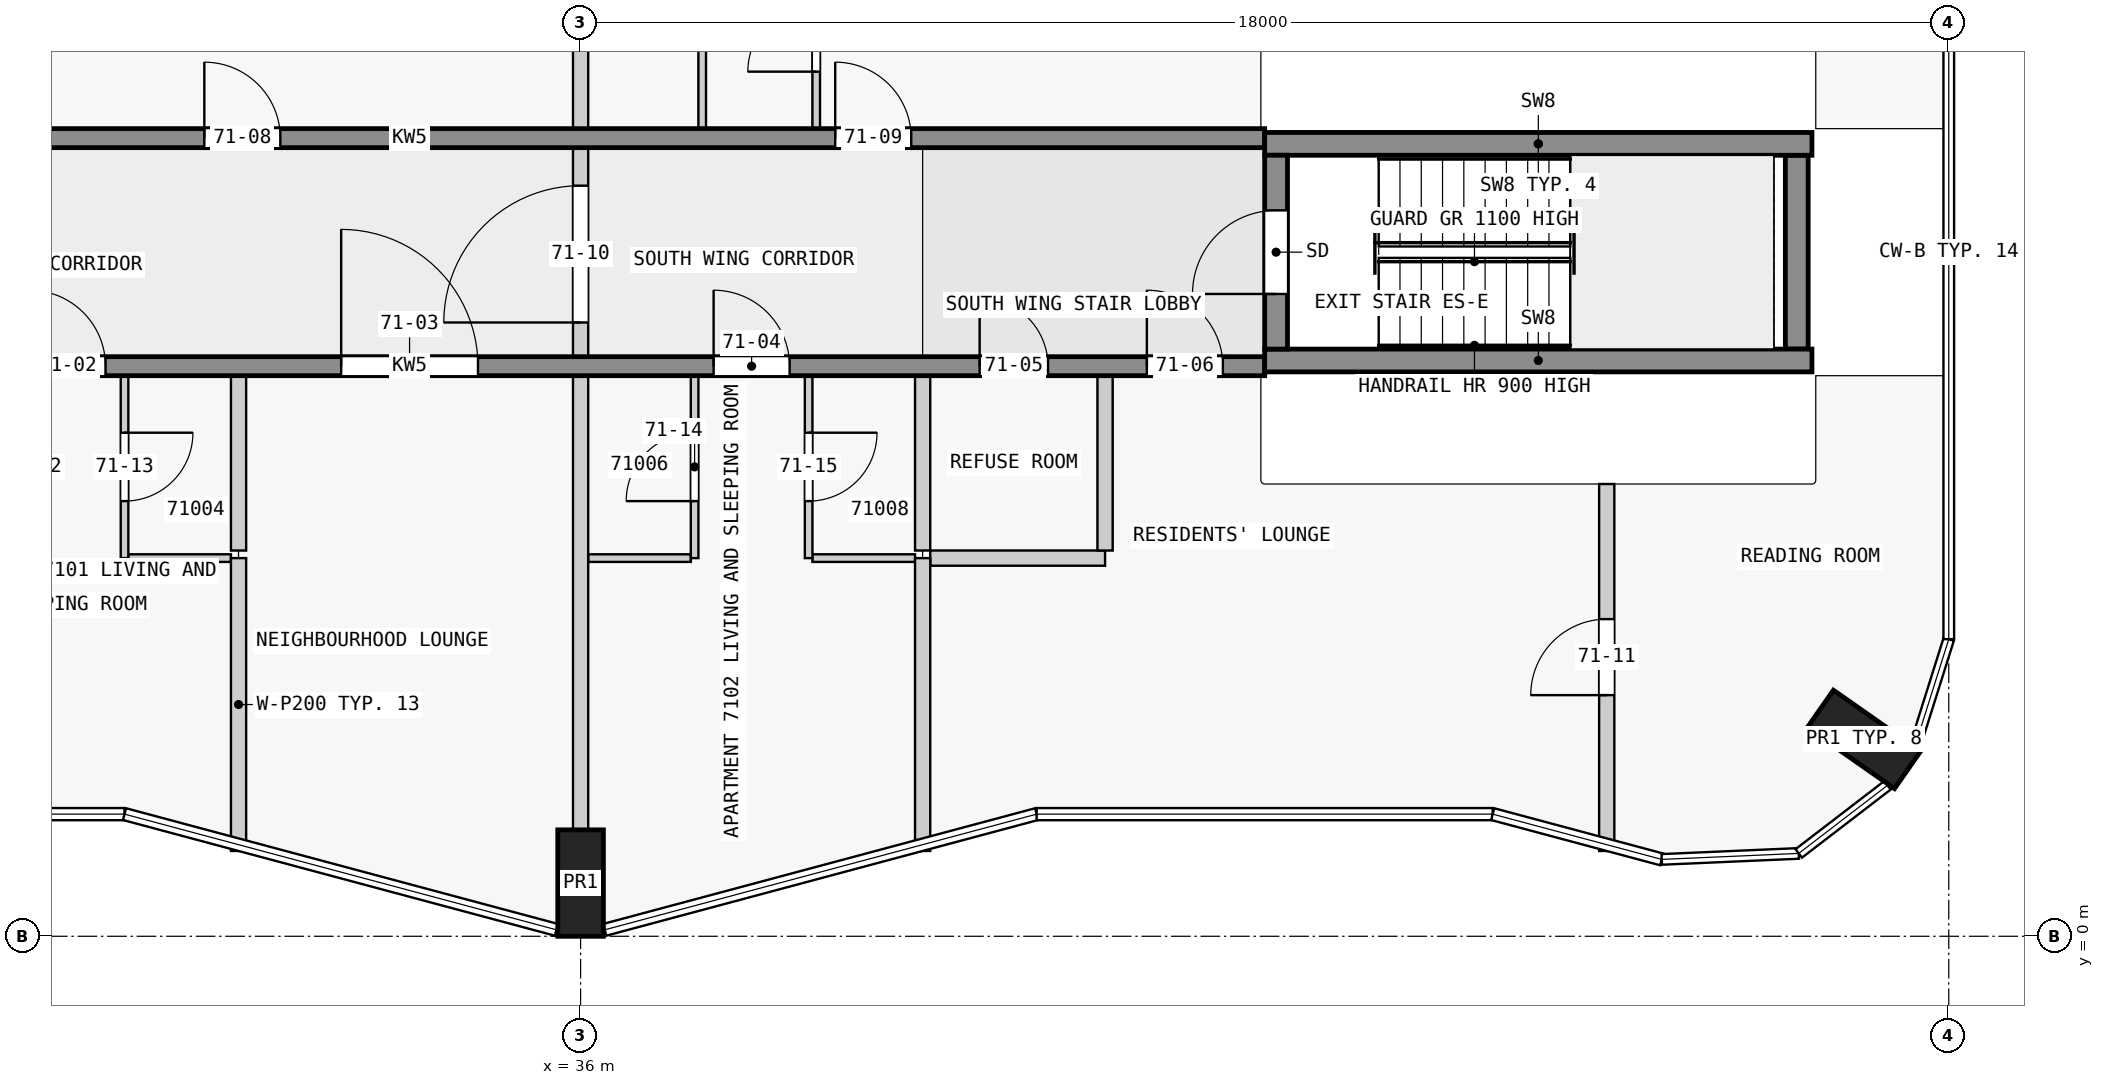
"""IFC4 building model, lengths in metres.
Left out: names, types, materials, properties, quantities, classifications, styles, units other than length and angle.
Written with IfcOpenShell. Run it as: python <this file> out.ifc"""

import sys

from ifc_helpers import new_model, si_unit, direction, frame, frame_2d, origin, origin_2d, place, context, subcontext, project, spatial, rectangle, extrude, element, fill, save


model = new_model("IFC4")
c1 = context("Model", 3, precision=1e-05, world=origin(), true_north=direction((0.0, 1.0)))
c2 = subcontext(c1, "Body", "Model", "MODEL_VIEW")
j1 = project(units=[si_unit("LENGTHUNIT", "METRE"), si_unit("PLANEANGLEUNIT", "RADIAN")], contexts=[c1])
p1 = place(None, origin())
s1 = spatial("IfcSite", under=j1, at=p1, CompositionType="ELEMENT")
p2 = place(p1, origin())
s2 = spatial("IfcBuilding", under=s1, at=p2, CompositionType="ELEMENT")
p3 = place(p2, frame((0.0, 0.0, 270.4)))
s3 = spatial("IfcBuildingStorey", under=s2, at=p3, CompositionType="ELEMENT", Elevation=270.4)
for number, where, z_axis, x_axis in (
    (1, (36.0, 0.7, 0.0), (0.0, 0.0, 1.0), (1.0, 0.0, 0.0)),
    (2, (52.884, 2.59, 0.0), (0.0, 0.0, 1.0), (0.574, 0.819, 0.0)),
):
    element("IfcColumn", number, at=place(p3, frame(where, z_axis=z_axis, x_axis=x_axis)), inside=s3, PredefinedType="COLUMN", context=c2, shape_type="SweptSolid", body=[
        extrude(rectangle(XDim=0.6, YDim=1.4, at=origin_2d()), origin(), (0.0, 0.0, 1.0), 3.5),
    ])
p4 = place(p3, frame((45.15, 7.725, 0.0), z_axis=(0.0, 0.0, 1.0), x_axis=(0.0, 1.0, 0.0)))
e3 = element("IfcWall", 3, at=p4, inside=s3, PredefinedType="SHEAR", context=c2, shape_type="SweptSolid", body=[
    extrude(rectangle(XDim=2.55, YDim=0.3, at=frame_2d((1.275, 0.0))), origin(), (0.0, 0.0, 1.0), 3.5),
])
p5 = place(p4, frame((0.725, 0.0, 0.0)))
e4 = element("IfcOpeningElement", 4, at=p5, cuts=e3, PredefinedType="OPENING", context=c2, shape_type="SweptSolid", body=[
    extrude(rectangle(XDim=1.1, YDim=2.1, at=frame_2d((0.55, 1.05))), frame((0.0, 0.16, 0.0), z_axis=(0.0, -1.0, 0.0), x_axis=(1.0, 0.0, 0.0)), (0.0, 0.0, 1.0), 0.32),
])
p6 = place(p3, frame((52.0, 7.725, 0.0), z_axis=(0.0, 0.0, 1.0), x_axis=(0.0, 1.0, 0.0)))
e5 = element("IfcWall", 5, at=p6, inside=s3, PredefinedType="SHEAR", context=c2, shape_type="SweptSolid", body=[
    extrude(rectangle(XDim=2.55, YDim=0.3, at=frame_2d((1.275, 0.0))), origin(), (0.0, 0.0, 1.0), 3.5),
])
for number, where, z_axis, x_axis in (
    (6, (45.0, 7.575, 0.0), (0.0, 0.0, 1.0), (1.0, 0.0, 0.0)),
    (7, (45.0, 10.425, 0.0), (0.0, 0.0, 1.0), (1.0, 0.0, 0.0)),
):
    element("IfcWall", number, at=place(p3, frame(where, z_axis=z_axis, x_axis=x_axis)), inside=s3, PredefinedType="SHEAR", context=c2, shape_type="SweptSolid", body=[
        extrude(rectangle(XDim=7.2, YDim=0.3, at=frame_2d((3.6, 0.0))), origin(), (0.0, 0.0, 1.0), 3.5),
    ])
p7 = place(p3, frame((22.5, 7.5, 0.0), z_axis=(0.0, 0.0, 1.0), x_axis=(1.0, 0.0, 0.0)))
e8 = element("IfcWall", 8, at=p7, inside=s3, PredefinedType="SHEAR", context=c2, shape_type="SweptSolid", body=[
    extrude(rectangle(XDim=22.5, YDim=0.25, at=frame_2d((11.25, 0.0))), origin(), (0.0, 0.0, 1.0), 3.25),
])
p8 = place(p7, frame((1.75, 0.0, 0.0)))
e9 = element("IfcOpeningElement", 9, at=p8, cuts=e8, PredefinedType="OPENING", context=c2, shape_type="SweptSolid", body=[
    extrude(rectangle(XDim=1.0, YDim=2.1, at=frame_2d((0.5, 1.05))), frame((0.0, 0.135, 0.0), z_axis=(0.0, -1.0, 0.0), x_axis=(1.0, 0.0, 0.0)), (0.0, 0.0, 1.0), 0.27),
])
p9 = place(p7, frame((6.25, 0.0, 0.0)))
e10 = element("IfcOpeningElement", 10, at=p9, cuts=e8, PredefinedType="OPENING", context=c2, shape_type="SweptSolid", body=[
    extrude(rectangle(XDim=1.0, YDim=2.1, at=frame_2d((0.5, 1.05))), frame((0.0, 0.135, 0.0), z_axis=(0.0, -1.0, 0.0), x_axis=(1.0, 0.0, 0.0)), (0.0, 0.0, 1.0), 0.27),
])
p10 = place(p7, frame((10.35, 0.0, 0.0)))
e11 = element("IfcOpeningElement", 11, at=p10, cuts=e8, PredefinedType="OPENING", context=c2, shape_type="SweptSolid", body=[
    extrude(rectangle(XDim=1.8, YDim=2.1, at=frame_2d((0.9, 1.05))), frame((0.0, 0.135, 0.0), z_axis=(0.0, -1.0, 0.0), x_axis=(1.0, 0.0, 0.0)), (0.0, 0.0, 1.0), 0.27),
])
p11 = place(p7, frame((15.25, 0.0, 0.0)))
e12 = element("IfcOpeningElement", 12, at=p11, cuts=e8, PredefinedType="OPENING", context=c2, shape_type="SweptSolid", body=[
    extrude(rectangle(XDim=1.0, YDim=2.1, at=frame_2d((0.5, 1.05))), frame((0.0, 0.135, 0.0), z_axis=(0.0, -1.0, 0.0), x_axis=(1.0, 0.0, 0.0)), (0.0, 0.0, 1.0), 0.27),
])
p12 = place(p7, frame((18.75, 0.0, 0.0)))
e13 = element("IfcOpeningElement", 13, at=p12, cuts=e8, PredefinedType="OPENING", context=c2, shape_type="SweptSolid", body=[
    extrude(rectangle(XDim=0.9, YDim=2.1, at=frame_2d((0.45, 1.05))), frame((0.0, 0.135, 0.0), z_axis=(0.0, -1.0, 0.0), x_axis=(1.0, 0.0, 0.0)), (0.0, 0.0, 1.0), 0.27),
])
p13 = place(p7, frame((20.95, 0.0, 0.0)))
e14 = element("IfcOpeningElement", 14, at=p13, cuts=e8, PredefinedType="OPENING", context=c2, shape_type="SweptSolid", body=[
    extrude(rectangle(XDim=1.0, YDim=2.1, at=frame_2d((0.5, 1.05))), frame((0.0, 0.135, 0.0), z_axis=(0.0, -1.0, 0.0), x_axis=(1.0, 0.0, 0.0)), (0.0, 0.0, 1.0), 0.27),
])
p14 = place(p3, frame((22.5, 10.5, 0.0), z_axis=(0.0, 0.0, 1.0), x_axis=(1.0, 0.0, 0.0)))
e15 = element("IfcWall", 15, at=p14, inside=s3, PredefinedType="SHEAR", context=c2, shape_type="SweptSolid", body=[
    extrude(rectangle(XDim=22.5, YDim=0.25, at=frame_2d((11.25, 0.0))), origin(), (0.0, 0.0, 1.0), 3.25),
])
p15 = place(p14, frame((1.75, 0.0, 0.0)))
e16 = element("IfcOpeningElement", 16, at=p15, cuts=e15, PredefinedType="OPENING", context=c2, shape_type="SweptSolid", body=[
    extrude(rectangle(XDim=1.0, YDim=2.1, at=frame_2d((0.5, 1.05))), frame((0.0, 0.135, 0.0), z_axis=(0.0, -1.0, 0.0), x_axis=(1.0, 0.0, 0.0)), (0.0, 0.0, 1.0), 0.27),
])
p16 = place(p14, frame((8.55, 0.0, 0.0)))
e17 = element("IfcOpeningElement", 17, at=p16, cuts=e15, PredefinedType="OPENING", context=c2, shape_type="SweptSolid", body=[
    extrude(rectangle(XDim=1.0, YDim=2.1, at=frame_2d((0.5, 1.05))), frame((0.0, 0.135, 0.0), z_axis=(0.0, -1.0, 0.0), x_axis=(1.0, 0.0, 0.0)), (0.0, 0.0, 1.0), 0.27),
])
p17 = place(p14, frame((16.85, 0.0, 0.0)))
e18 = element("IfcOpeningElement", 18, at=p17, cuts=e15, PredefinedType="OPENING", context=c2, shape_type="SweptSolid", body=[
    extrude(rectangle(XDim=1.0, YDim=2.1, at=frame_2d((0.5, 1.05))), frame((0.0, 0.135, 0.0), z_axis=(0.0, -1.0, 0.0), x_axis=(1.0, 0.0, 0.0)), (0.0, 0.0, 1.0), 0.27),
])
for number, where, z_axis, x_axis in (
    (19, (30.05, 4.975, 0.0), (0.0, 0.0, 1.0), (1.0, 0.0, 0.0)),
    (20, (36.1, 4.975, 0.0), (0.0, 0.0, 1.0), (1.0, 0.0, 0.0)),
    (21, (39.05, 4.975, 0.0), (0.0, 0.0, 1.0), (1.0, 0.0, 0.0)),
):
    element("IfcWall", number, at=place(p3, frame(where, z_axis=z_axis, x_axis=x_axis)), inside=s3, PredefinedType="PARTITIONING", context=c2, shape_type="SweptSolid", body=[
        extrude(rectangle(XDim=1.35, YDim=0.1, at=frame_2d((0.675, 0.0))), origin(), (0.0, 0.0, 1.0), 3.25),
    ])
p18 = place(p3, frame((40.6, 4.975, 0.0), z_axis=(0.0, 0.0, 1.0), x_axis=(1.0, 0.0, 0.0)))
e22 = element("IfcWall", 22, at=p18, inside=s3, PredefinedType="PARTITIONING", context=c2, shape_type="SweptSolid", body=[
    extrude(rectangle(XDim=2.3, YDim=0.2, at=frame_2d((1.15, 0.0))), origin(), (0.0, 0.0, 1.0), 3.25),
])
p19 = place(p3, frame((30.0, 7.375, 0.0), z_axis=(0.0, 0.0, 1.0), x_axis=(0.0, -1.0, 0.0)))
e23 = element("IfcWall", 23, at=p19, inside=s3, PredefinedType="PARTITIONING", context=c2, shape_type="SweptSolid", body=[
    extrude(rectangle(XDim=2.4, YDim=0.1, at=frame_2d((1.2, 0.0))), origin(), (0.0, 0.0, 1.0), 3.25),
])
p20 = place(p19, frame((0.75, 0.0, 0.0)))
e24 = element("IfcOpeningElement", 24, at=p20, cuts=e23, PredefinedType="OPENING", context=c2, shape_type="SweptSolid", body=[
    extrude(rectangle(XDim=0.9, YDim=2.1, at=frame_2d((0.45, 1.05))), frame((0.0, 0.06, 0.0), z_axis=(0.0, -1.0, 0.0), x_axis=(1.0, 0.0, 0.0)), (0.0, 0.0, 1.0), 0.12),
])
p21 = place(p3, frame((31.5, 4.975, 0.0), z_axis=(0.0, 0.0, 1.0), x_axis=(0.0, -1.0, 0.0)))
e25 = element("IfcWall", 25, at=p21, inside=s3, PredefinedType="PARTITIONING", context=c2, shape_type="SweptSolid", body=[
    extrude(rectangle(XDim=3.853, YDim=0.2, at=frame_2d((1.926, 0.0))), origin(), (0.0, 0.0, 1.0), 3.25),
])
p22 = place(p3, frame((31.5, 5.075, 0.0), z_axis=(0.0, 0.0, 1.0), x_axis=(0.0, 1.0, 0.0)))
e26 = element("IfcWall", 26, at=p22, inside=s3, PredefinedType="PARTITIONING", context=c2, shape_type="SweptSolid", body=[
    extrude(rectangle(XDim=2.3, YDim=0.2, at=frame_2d((1.15, 0.0))), origin(), (0.0, 0.0, 1.0), 3.25),
])
for number, where, z_axis, x_axis in (
    (27, (36.0, 1.4, 0.0), (0.0, 0.0, 1.0), (0.0, 1.0, 0.0)),
    (28, (36.0, 10.625, 0.0), (0.0, 0.0, 1.0), (0.0, 1.0, 0.0)),
):
    element("IfcWall", number, at=place(p3, frame(where, z_axis=z_axis, x_axis=x_axis)), inside=s3, PredefinedType="PARTITIONING", context=c2, shape_type="SweptSolid", body=[
        extrude(rectangle(XDim=5.975, YDim=0.2, at=frame_2d((2.988, 0.0))), origin(), (0.0, 0.0, 1.0), 3.25),
    ])
p23 = place(p3, frame((37.5, 4.975, 0.0), z_axis=(0.0, 0.0, 1.0), x_axis=(0.0, 1.0, 0.0)))
e29 = element("IfcWall", 29, at=p23, inside=s3, PredefinedType="PARTITIONING", context=c2, shape_type="SweptSolid", body=[
    extrude(rectangle(XDim=2.4, YDim=0.1, at=frame_2d((1.2, 0.0))), origin(), (0.0, 0.0, 1.0), 3.25),
])
p24 = place(p23, frame((0.75, 0.0, 0.0)))
e30 = element("IfcOpeningElement", 30, at=p24, cuts=e29, PredefinedType="OPENING", context=c2, shape_type="SweptSolid", body=[
    extrude(rectangle(XDim=0.9, YDim=2.1, at=frame_2d((0.45, 1.05))), frame((0.0, 0.06, 0.0), z_axis=(0.0, -1.0, 0.0), x_axis=(1.0, 0.0, 0.0)), (0.0, 0.0, 1.0), 0.12),
])
p25 = place(p3, frame((37.6, 10.625, 0.0), z_axis=(0.0, 0.0, 1.0), x_axis=(0.0, 1.0, 0.0)))
e31 = element("IfcWall", 31, at=p25, inside=s3, PredefinedType="PARTITIONING", context=c2, shape_type="SweptSolid", body=[
    extrude(rectangle(XDim=2.35, YDim=0.1, at=frame_2d((1.175, 0.0))), origin(), (0.0, 0.0, 1.0), 3.25),
])
p26 = place(p3, frame((39.0, 7.375, 0.0), z_axis=(0.0, 0.0, 1.0), x_axis=(0.0, -1.0, 0.0)))
e32 = element("IfcWall", 32, at=p26, inside=s3, PredefinedType="PARTITIONING", context=c2, shape_type="SweptSolid", body=[
    extrude(rectangle(XDim=2.4, YDim=0.1, at=frame_2d((1.2, 0.0))), origin(), (0.0, 0.0, 1.0), 3.25),
])
p27 = place(p26, frame((0.75, 0.0, 0.0)))
e33 = element("IfcOpeningElement", 33, at=p27, cuts=e32, PredefinedType="OPENING", context=c2, shape_type="SweptSolid", body=[
    extrude(rectangle(XDim=0.9, YDim=2.1, at=frame_2d((0.45, 1.05))), frame((0.0, 0.06, 0.0), z_axis=(0.0, -1.0, 0.0), x_axis=(1.0, 0.0, 0.0)), (0.0, 0.0, 1.0), 0.12),
])
p28 = place(p3, frame((39.1, 10.625, 0.0), z_axis=(0.0, 0.0, 1.0), x_axis=(0.0, 1.0, 0.0)))
e34 = element("IfcWall", 34, at=p28, inside=s3, PredefinedType="PARTITIONING", context=c2, shape_type="SweptSolid", body=[
    extrude(rectangle(XDim=2.35, YDim=0.1, at=frame_2d((1.175, 0.0))), origin(), (0.0, 0.0, 1.0), 3.25),
])
p29 = place(p28, frame((0.75, 0.0, 0.0)))
e35 = element("IfcOpeningElement", 35, at=p29, cuts=e34, PredefinedType="OPENING", context=c2, shape_type="SweptSolid", body=[
    extrude(rectangle(XDim=0.9, YDim=2.1, at=frame_2d((0.45, 1.05))), frame((0.0, 0.06, 0.0), z_axis=(0.0, -1.0, 0.0), x_axis=(1.0, 0.0, 0.0)), (0.0, 0.0, 1.0), 0.12),
])
p30 = place(p3, frame((40.5, 4.975, 0.0), z_axis=(0.0, 0.0, 1.0), x_axis=(0.0, -1.0, 0.0)))
e36 = element("IfcWall", 36, at=p30, inside=s3, PredefinedType="PARTITIONING", context=c2, shape_type="SweptSolid", body=[
    extrude(rectangle(XDim=3.853, YDim=0.2, at=frame_2d((1.926, 0.0))), origin(), (0.0, 0.0, 1.0), 3.25),
])
for number, where, z_axis, x_axis in (
    (37, (40.5, 5.075, 0.0), (0.0, 0.0, 1.0), (0.0, 1.0, 0.0)),
    (38, (42.9, 5.075, 0.0), (0.0, 0.0, 1.0), (0.0, 1.0, 0.0)),
):
    element("IfcWall", number, at=place(p3, frame(where, z_axis=z_axis, x_axis=x_axis)), inside=s3, PredefinedType="PARTITIONING", context=c2, shape_type="SweptSolid", body=[
        extrude(rectangle(XDim=2.3, YDim=0.2, at=frame_2d((1.15, 0.0))), origin(), (0.0, 0.0, 1.0), 3.25),
    ])
p31 = place(p3, frame((49.5, 1.122, 0.0), z_axis=(0.0, 0.0, 1.0), x_axis=(0.0, 1.0, 0.0)))
e39 = element("IfcWall", 39, at=p31, inside=s3, PredefinedType="PARTITIONING", context=c2, shape_type="SweptSolid", body=[
    extrude(rectangle(XDim=4.828, YDim=0.2, at=frame_2d((2.414, 0.0))), origin(), (0.0, 0.0, 1.0), 3.25),
])
p32 = place(p31, frame((2.05, 0.0, 0.0)))
e40 = element("IfcOpeningElement", 40, at=p32, cuts=e39, PredefinedType="OPENING", context=c2, shape_type="SweptSolid", body=[
    extrude(rectangle(XDim=1.0, YDim=2.1, at=frame_2d((0.5, 1.05))), frame((0.0, 0.11, 0.0), z_axis=(0.0, -1.0, 0.0), x_axis=(1.0, 0.0, 0.0)), (0.0, 0.0, 1.0), 0.22),
])
p33 = place(p3, frame((36.0, 7.475, 0.0), z_axis=(0.0, 0.0, 1.0), x_axis=(0.0, 1.0, 0.0)))
e41 = element("IfcWall", 41, at=p33, inside=s3, PredefinedType="PARTITIONING", context=c2, shape_type="SweptSolid", body=[
    extrude(rectangle(XDim=3.05, YDim=0.2, at=frame_2d((1.525, 0.0))), origin(), (0.0, 0.0, 1.0), 3.25),
])
p34 = place(p33, frame((0.6, 0.0, 0.0)))
e42 = element("IfcOpeningElement", 42, at=p34, cuts=e41, PredefinedType="OPENING", context=c2, shape_type="SweptSolid", body=[
    extrude(rectangle(XDim=1.8, YDim=2.1, at=frame_2d((0.9, 1.05))), frame((0.0, 0.11, 0.0), z_axis=(0.0, -1.0, 0.0), x_axis=(1.0, 0.0, 0.0)), (0.0, 0.0, 1.0), 0.22),
])
p35 = place(p5, origin())
e43 = element("IfcDoor", 43, at=p35, inside=s3, OperationType="SINGLE_SWING_LEFT", PredefinedType="DOOR", context=c2, shape_type="SweptSolid", body=[
    extrude(rectangle(XDim=1.1, YDim=2.1, at=frame_2d((0.55, 1.05))), frame((0.0, 0.025, 0.0), z_axis=(0.0, -1.0, 0.0), x_axis=(1.0, 0.0, 0.0)), (0.0, 0.0, 1.0), 0.05),
])
fill(e4, e43)
p36 = place(p9, origin())
e44 = element("IfcDoor", 44, at=p36, inside=s3, OperationType="SINGLE_SWING_LEFT", PredefinedType="DOOR", context=c2, shape_type="SweptSolid", body=[
    extrude(rectangle(XDim=1.0, YDim=2.1, at=frame_2d((0.5, 1.05))), frame((0.0, 0.025, 0.0), z_axis=(0.0, -1.0, 0.0), x_axis=(1.0, 0.0, 0.0)), (0.0, 0.0, 1.0), 0.05),
])
fill(e10, e44)
p37 = place(p10, origin())
e45 = element("IfcDoor", 45, at=p37, inside=s3, OperationType="SINGLE_SWING_LEFT", PredefinedType="DOOR", context=c2, shape_type="SweptSolid", body=[
    extrude(rectangle(XDim=1.8, YDim=2.1, at=frame_2d((0.9, 1.05))), frame((0.0, 0.025, 0.0), z_axis=(0.0, -1.0, 0.0), x_axis=(1.0, 0.0, 0.0)), (0.0, 0.0, 1.0), 0.05),
])
fill(e11, e45)
p38 = place(p11, origin())
e46 = element("IfcDoor", 46, at=p38, inside=s3, OperationType="SINGLE_SWING_RIGHT", PredefinedType="DOOR", context=c2, shape_type="SweptSolid", body=[
    extrude(rectangle(XDim=1.0, YDim=2.1, at=frame_2d((0.5, 1.05))), frame((0.0, 0.025, 0.0), z_axis=(0.0, -1.0, 0.0), x_axis=(1.0, 0.0, 0.0)), (0.0, 0.0, 1.0), 0.05),
])
fill(e12, e46)
p39 = place(p12, origin())
e47 = element("IfcDoor", 47, at=p39, inside=s3, OperationType="SINGLE_SWING_RIGHT", PredefinedType="DOOR", context=c2, shape_type="SweptSolid", body=[
    extrude(rectangle(XDim=0.9, YDim=2.1, at=frame_2d((0.45, 1.05))), frame((0.0, 0.025, 0.0), z_axis=(0.0, -1.0, 0.0), x_axis=(1.0, 0.0, 0.0)), (0.0, 0.0, 1.0), 0.05),
])
fill(e13, e47)
p40 = place(p13, origin())
e48 = element("IfcDoor", 48, at=p40, inside=s3, OperationType="SINGLE_SWING_RIGHT", PredefinedType="DOOR", context=c2, shape_type="SweptSolid", body=[
    extrude(rectangle(XDim=1.0, YDim=2.1, at=frame_2d((0.5, 1.05))), frame((0.0, 0.025, 0.0), z_axis=(0.0, -1.0, 0.0), x_axis=(1.0, 0.0, 0.0)), (0.0, 0.0, 1.0), 0.05),
])
fill(e14, e48)
p41 = place(p16, origin())
e49 = element("IfcDoor", 49, at=p41, inside=s3, OperationType="SINGLE_SWING_LEFT", PredefinedType="DOOR", context=c2, shape_type="SweptSolid", body=[
    extrude(rectangle(XDim=1.0, YDim=2.1, at=frame_2d((0.5, 1.05))), frame((0.0, 0.025, 0.0), z_axis=(0.0, -1.0, 0.0), x_axis=(1.0, 0.0, 0.0)), (0.0, 0.0, 1.0), 0.05),
])
fill(e17, e49)
p42 = place(p17, origin())
e50 = element("IfcDoor", 50, at=p42, inside=s3, OperationType="SINGLE_SWING_RIGHT", PredefinedType="DOOR", context=c2, shape_type="SweptSolid", body=[
    extrude(rectangle(XDim=1.0, YDim=2.1, at=frame_2d((0.5, 1.05))), frame((0.0, 0.025, 0.0), z_axis=(0.0, -1.0, 0.0), x_axis=(1.0, 0.0, 0.0)), (0.0, 0.0, 1.0), 0.05),
])
fill(e18, e50)
p43 = place(p34, origin())
e51 = element("IfcDoor", 51, at=p43, inside=s3, OperationType="SINGLE_SWING_LEFT", PredefinedType="DOOR", context=c2, shape_type="SweptSolid", body=[
    extrude(rectangle(XDim=1.8, YDim=2.1, at=frame_2d((0.9, 1.05))), frame((0.0, 0.025, 0.0), z_axis=(0.0, -1.0, 0.0), x_axis=(1.0, 0.0, 0.0)), (0.0, 0.0, 1.0), 0.05),
])
fill(e42, e51)
p44 = place(p32, origin())
e52 = element("IfcDoor", 52, at=p44, inside=s3, OperationType="SINGLE_SWING_RIGHT", PredefinedType="DOOR", context=c2, shape_type="SweptSolid", body=[
    extrude(rectangle(XDim=1.0, YDim=2.1, at=frame_2d((0.5, 1.05))), frame((0.0, 0.025, 0.0), z_axis=(0.0, -1.0, 0.0), x_axis=(1.0, 0.0, 0.0)), (0.0, 0.0, 1.0), 0.05),
])
fill(e40, e52)
p45 = place(p20, origin())
e53 = element("IfcDoor", 53, at=p45, inside=s3, OperationType="SINGLE_SWING_LEFT", PredefinedType="DOOR", context=c2, shape_type="SweptSolid", body=[
    extrude(rectangle(XDim=0.9, YDim=2.1, at=frame_2d((0.45, 1.05))), frame((0.0, 0.025, 0.0), z_axis=(0.0, -1.0, 0.0), x_axis=(1.0, 0.0, 0.0)), (0.0, 0.0, 1.0), 0.05),
])
fill(e24, e53)
p46 = place(p24, origin())
e54 = element("IfcDoor", 54, at=p46, inside=s3, OperationType="SINGLE_SWING_LEFT", PredefinedType="DOOR", context=c2, shape_type="SweptSolid", body=[
    extrude(rectangle(XDim=0.9, YDim=2.1, at=frame_2d((0.45, 1.05))), frame((0.0, 0.025, 0.0), z_axis=(0.0, -1.0, 0.0), x_axis=(1.0, 0.0, 0.0)), (0.0, 0.0, 1.0), 0.05),
])
fill(e30, e54)
p47 = place(p27, origin())
e55 = element("IfcDoor", 55, at=p47, inside=s3, OperationType="SINGLE_SWING_LEFT", PredefinedType="DOOR", context=c2, shape_type="SweptSolid", body=[
    extrude(rectangle(XDim=0.9, YDim=2.1, at=frame_2d((0.45, 1.05))), frame((0.0, 0.025, 0.0), z_axis=(0.0, -1.0, 0.0), x_axis=(1.0, 0.0, 0.0)), (0.0, 0.0, 1.0), 0.05),
])
fill(e33, e55)
p48 = place(p29, origin())
e56 = element("IfcDoor", 56, at=p48, inside=s3, OperationType="SINGLE_SWING_RIGHT", PredefinedType="DOOR", context=c2, shape_type="SweptSolid", body=[
    extrude(rectangle(XDim=0.9, YDim=2.1, at=frame_2d((0.45, 1.05))), frame((0.0, 0.025, 0.0), z_axis=(0.0, -1.0, 0.0), x_axis=(1.0, 0.0, 0.0)), (0.0, 0.0, 1.0), 0.05),
])
fill(e35, e56)
save(model, sys.argv[1])
